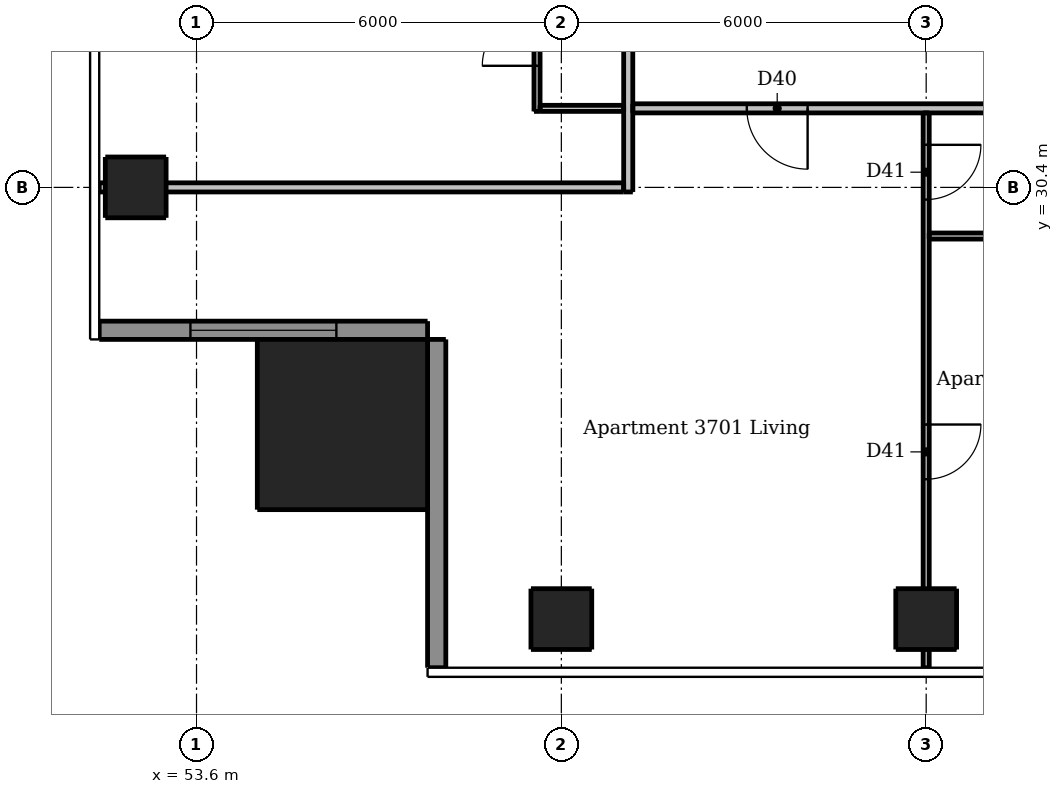
"""IFC4 building model, lengths in metres.
Left out: names, types, materials, properties, quantities, classifications, styles, units other than length and angle.
Written with IfcOpenShell. Run it as: python <this file> out.ifc"""

import sys

from ifc_helpers import new_model, si_unit, direction, frame, frame_2d, origin, origin_2d, place, context, subcontext, project, spatial, rectangle, extrude, element, fill, save


model = new_model("IFC4")
c1 = context("Model", 3, precision=1e-05, world=origin(), true_north=direction((0.0, 1.0)))
c2 = subcontext(c1, "Body", "Model", "MODEL_VIEW")
j1 = project(units=[si_unit("LENGTHUNIT", "METRE"), si_unit("PLANEANGLEUNIT", "RADIAN")], contexts=[c1])
p1 = place(None, origin())
s1 = spatial("IfcSite", under=j1, at=p1, CompositionType="ELEMENT")
p2 = place(p1, origin())
s2 = spatial("IfcBuilding", under=s1, at=p2, CompositionType="ELEMENT")
p3 = place(p2, frame((0.0, 0.0, 140.5)))
s3 = spatial("IfcBuildingStorey", under=s2, at=p3, CompositionType="ELEMENT", Elevation=140.5)
for number, where, z_axis, x_axis in (
    (1, (59.6, 23.3, 0.0), (0.0, 0.0, 1.0), (1.0, 0.0, 0.0)),
    (2, (65.6, 23.3, 0.0), (0.0, 0.0, 1.0), (1.0, 0.0, 0.0)),
    (3, (52.6, 30.4, 0.0), (0.0, 0.0, 1.0), (1.0, 0.0, 0.0)),
):
    element("IfcColumn", number, at=place(p3, frame(where, z_axis=z_axis, x_axis=x_axis)), inside=s3, PredefinedType="COLUMN", context=c2, shape_type="SweptSolid", body=[
        extrude(rectangle(XDim=1.0, YDim=1.0, at=origin_2d()), origin(), (0.0, 0.0, 1.0), 3.05),
    ])
p4 = place(p3, frame((56.0, 26.5, 0.0), z_axis=(0.0, 0.0, 1.0), x_axis=(1.0, 0.0, 0.0)))
e4 = element("IfcColumn", 4, at=p4, inside=s3, PredefinedType="COLUMN", context=c2, shape_type="SweptSolid", body=[
    extrude(rectangle(XDim=2.8, YDim=2.8, at=origin_2d()), origin(), (0.0, 0.0, 1.0), 3.3),
])
p5 = place(p3, frame((52.0, 28.05, 0.0), z_axis=(0.0, 0.0, 1.0), x_axis=(1.0, 0.0, 0.0)))
e5 = element("IfcWall", 5, at=p5, inside=s3, PredefinedType="SOLIDWALL", context=c2, shape_type="SweptSolid", body=[
    extrude(rectangle(XDim=5.4, YDim=0.3, at=frame_2d((2.7, 0.0))), origin(), (0.0, 0.0, 1.0), 3.05),
])
p6 = place(p5, frame((1.5, 0.0, 0.15)))
e6 = element("IfcOpeningElement", 6, at=p6, cuts=e5, PredefinedType="OPENING", context=c2, shape_type="SweptSolid", body=[
    extrude(rectangle(XDim=2.4, YDim=2.1, at=frame_2d((1.2, 1.05))), frame((0.0, 0.16, 0.0), z_axis=(0.0, -1.0, 0.0), x_axis=(1.0, 0.0, 0.0)), (0.0, 0.0, 1.0), 0.32),
])
p7 = place(p3, frame((57.55, 27.9, 0.0), z_axis=(0.0, 0.0, 1.0), x_axis=(0.0, -1.0, 0.0)))
e7 = element("IfcWall", 7, at=p7, inside=s3, PredefinedType="SOLIDWALL", context=c2, shape_type="SweptSolid", body=[
    extrude(rectangle(XDim=5.4, YDim=0.3, at=frame_2d((2.7, 0.0))), origin(), (0.0, 0.0, 1.0), 3.05),
])
p8 = place(p3, frame((59.2, 31.65, 0.0), z_axis=(0.0, 0.0, 1.0), x_axis=(0.0, 1.0, 0.0)))
e8 = element("IfcWall", 8, at=p8, inside=s3, PredefinedType="PARTITIONING", context=c2, shape_type="SweptSolid", body=[
    extrude(rectangle(XDim=16.675, YDim=0.1, at=frame_2d((8.337, 0.0))), origin(), (0.0, 0.0, 1.0), 3.05),
])
p9 = place(p8, frame((0.75, 0.0, 0.0)))
e9 = element("IfcOpeningElement", 9, at=p9, cuts=e8, PredefinedType="OPENING", context=c2, shape_type="SweptSolid", body=[
    extrude(rectangle(XDim=0.9, YDim=2.1, at=frame_2d((0.45, 1.05))), frame((0.0, 0.06, 0.0), z_axis=(0.0, -1.0, 0.0), x_axis=(1.0, 0.0, 0.0)), (0.0, 0.0, 1.0), 0.12),
])
p10 = place(p8, frame((3.1, 0.0, 0.0)))
e10 = element("IfcOpeningElement", 10, at=p10, cuts=e8, PredefinedType="OPENING", context=c2, shape_type="SweptSolid", body=[
    extrude(rectangle(XDim=0.9, YDim=2.1, at=frame_2d((0.45, 1.05))), frame((0.0, 0.06, 0.0), z_axis=(0.0, -1.0, 0.0), x_axis=(1.0, 0.0, 0.0)), (0.0, 0.0, 1.0), 0.12),
])
p11 = place(p8, frame((8.5, 0.0, 0.0)))
e11 = element("IfcOpeningElement", 11, at=p11, cuts=e8, PredefinedType="OPENING", context=c2, shape_type="SweptSolid", body=[
    extrude(rectangle(XDim=0.9, YDim=2.1, at=frame_2d((0.45, 1.05))), frame((0.0, 0.06, 0.0), z_axis=(0.0, -1.0, 0.0), x_axis=(1.0, 0.0, 0.0)), (0.0, 0.0, 1.0), 0.12),
])
p12 = place(p8, frame((14.5, 0.0, 0.0)))
e12 = element("IfcOpeningElement", 12, at=p12, cuts=e8, PredefinedType="OPENING", context=c2, shape_type="SweptSolid", body=[
    extrude(rectangle(XDim=0.9, YDim=2.1, at=frame_2d((0.45, 1.05))), frame((0.0, 0.06, 0.0), z_axis=(0.0, -1.0, 0.0), x_axis=(1.0, 0.0, 0.0)), (0.0, 0.0, 1.0), 0.12),
])
p13 = place(p8, frame((5.55, 0.0, 0.0)))
e13 = element("IfcOpeningElement", 13, at=p13, cuts=e8, PredefinedType="OPENING", context=c2, shape_type="SweptSolid", body=[
    extrude(rectangle(XDim=0.8, YDim=2.1, at=frame_2d((0.4, 1.05))), frame((0.0, 0.06, 0.0), z_axis=(0.0, -1.0, 0.0), x_axis=(1.0, 0.0, 0.0)), (0.0, 0.0, 1.0), 0.12),
])
p14 = place(p8, frame((11.55, 0.0, 0.0)))
e14 = element("IfcOpeningElement", 14, at=p14, cuts=e8, PredefinedType="OPENING", context=c2, shape_type="SweptSolid", body=[
    extrude(rectangle(XDim=0.8, YDim=2.1, at=frame_2d((0.4, 1.05))), frame((0.0, 0.06, 0.0), z_axis=(0.0, -1.0, 0.0), x_axis=(1.0, 0.0, 0.0)), (0.0, 0.0, 1.0), 0.12),
])
p15 = place(p3, frame((65.6, 31.625, 0.0), z_axis=(0.0, 0.0, 1.0), x_axis=(0.0, -1.0, 0.0)))
e15 = element("IfcWall", 15, at=p15, inside=s3, PredefinedType="PARTITIONING", context=c2, shape_type="SweptSolid", body=[
    extrude(rectangle(XDim=9.125, YDim=0.1, at=frame_2d((4.562, 0.0))), origin(), (0.0, 0.0, 1.0), 2.516),
])
p16 = place(p15, frame((0.525, 0.0, 0.0)))
e16 = element("IfcOpeningElement", 16, at=p16, cuts=e15, PredefinedType="OPENING", context=c2, shape_type="SweptSolid", body=[
    extrude(rectangle(XDim=0.9, YDim=2.1, at=frame_2d((0.45, 1.05))), frame((0.0, 0.06, 0.0), z_axis=(0.0, -1.0, 0.0), x_axis=(1.0, 0.0, 0.0)), (0.0, 0.0, 1.0), 0.12),
])
p17 = place(p15, frame((5.125, 0.0, 0.0)))
e17 = element("IfcOpeningElement", 17, at=p17, cuts=e15, PredefinedType="OPENING", context=c2, shape_type="SweptSolid", body=[
    extrude(rectangle(XDim=0.9, YDim=2.1, at=frame_2d((0.45, 1.05))), frame((0.0, 0.06, 0.0), z_axis=(0.0, -1.0, 0.0), x_axis=(1.0, 0.0, 0.0)), (0.0, 0.0, 1.0), 0.12),
])
p18 = place(p3, frame((59.25, 31.7, 0.0), z_axis=(0.0, 0.0, 1.0), x_axis=(1.0, 0.0, 0.0)))
e18 = element("IfcWall", 18, at=p18, inside=s3, PredefinedType="PARTITIONING", context=c2, shape_type="SweptSolid", body=[
    extrude(rectangle(XDim=1.375, YDim=0.1, at=frame_2d((0.688, 0.0))), origin(), (0.0, 0.0, 1.0), 3.05),
])
p19 = place(p3, frame((65.65, 29.6, 0.0), z_axis=(0.0, 0.0, 1.0), x_axis=(1.0, 0.0, 0.0)))
e19 = element("IfcWall", 19, at=p19, inside=s3, PredefinedType="PARTITIONING", context=c2, shape_type="SweptSolid", body=[
    extrude(rectangle(XDim=5.875, YDim=0.1, at=frame_2d((2.938, 0.0))), origin(), (0.0, 0.0, 1.0), 3.05),
])
p20 = place(p19, frame((3.75, 0.0, 0.0)))
e20 = element("IfcOpeningElement", 20, at=p20, cuts=e19, PredefinedType="OPENING", context=c2, shape_type="SweptSolid", body=[
    extrude(rectangle(XDim=0.8, YDim=2.1, at=frame_2d((0.4, 1.05))), frame((0.0, 0.06, 0.0), z_axis=(0.0, -1.0, 0.0), x_axis=(1.0, 0.0, 0.0)), (0.0, 0.0, 1.0), 0.12),
])
p21 = place(p3, frame((60.7, 30.325, 0.0), z_axis=(0.0, 0.0, 1.0), x_axis=(0.0, 1.0, 0.0)))
e21 = element("IfcWall", 21, at=p21, inside=s3, PredefinedType="PARTITIONING", context=c2, shape_type="SweptSolid", body=[
    extrude(rectangle(XDim=28.9, YDim=0.15, at=frame_2d((14.45, 0.0))), origin(), (0.0, 0.0, 1.0), 3.05),
])
p22 = place(p21, frame((9.225, 0.0, 0.0)))
e22 = element("IfcOpeningElement", 22, at=p22, cuts=e21, PredefinedType="OPENING", context=c2, shape_type="SweptSolid", body=[
    extrude(rectangle(XDim=1.0, YDim=2.1, at=frame_2d((0.5, 1.05))), frame((0.0, 0.085, 0.0), z_axis=(0.0, -1.0, 0.0), x_axis=(1.0, 0.0, 0.0)), (0.0, 0.0, 1.0), 0.17),
])
p23 = place(p21, frame((26.025, 0.0, 0.0)))
e23 = element("IfcOpeningElement", 23, at=p23, cuts=e21, PredefinedType="OPENING", context=c2, shape_type="SweptSolid", body=[
    extrude(rectangle(XDim=1.0, YDim=2.1, at=frame_2d((0.5, 1.05))), frame((0.0, 0.085, 0.0), z_axis=(0.0, -1.0, 0.0), x_axis=(1.0, 0.0, 0.0)), (0.0, 0.0, 1.0), 0.17),
])
p24 = place(p3, frame((89.525, 31.7, 0.0), z_axis=(0.0, 0.0, 1.0), x_axis=(-1.0, 0.0, 0.0)))
e24 = element("IfcWall", 24, at=p24, inside=s3, PredefinedType="PARTITIONING", context=c2, shape_type="SweptSolid", body=[
    extrude(rectangle(XDim=28.75, YDim=0.15, at=frame_2d((14.375, 0.0))), origin(), (0.0, 0.0, 1.0), 3.05),
])
p25 = place(p24, frame((25.875, 0.0, 0.0)))
e25 = element("IfcOpeningElement", 25, at=p25, cuts=e24, PredefinedType="OPENING", context=c2, shape_type="SweptSolid", body=[
    extrude(rectangle(XDim=1.0, YDim=2.1, at=frame_2d((0.5, 1.05))), frame((0.0, 0.085, 0.0), z_axis=(0.0, -1.0, 0.0), x_axis=(1.0, 0.0, 0.0)), (0.0, 0.0, 1.0), 0.17),
])
p26 = place(p24, frame((9.075, 0.0, 0.0)))
e26 = element("IfcOpeningElement", 26, at=p26, cuts=e24, PredefinedType="OPENING", context=c2, shape_type="SweptSolid", body=[
    extrude(rectangle(XDim=1.0, YDim=2.1, at=frame_2d((0.5, 1.05))), frame((0.0, 0.085, 0.0), z_axis=(0.0, -1.0, 0.0), x_axis=(1.0, 0.0, 0.0)), (0.0, 0.0, 1.0), 0.17),
])
p27 = place(p3, frame((52.0, 30.4, 0.0), z_axis=(0.0, 0.0, 1.0), x_axis=(1.0, 0.0, 0.0)))
e27 = element("IfcWall", 27, at=p27, inside=s3, PredefinedType="PARTITIONING", context=c2, shape_type="SweptSolid", body=[
    extrude(rectangle(XDim=8.625, YDim=0.15, at=frame_2d((4.312, 0.0))), origin(), (0.0, 0.0, 1.0), 2.647),
])
p28 = place(p6, origin())
e28 = element("IfcWindow", 28, at=p28, inside=s3, PartitioningType="DOUBLE_PANEL_VERTICAL", PredefinedType="WINDOW", context=c2, shape_type="SweptSolid", body=[
    extrude(rectangle(XDim=2.4, YDim=2.1, at=frame_2d((1.2, 1.05))), frame((0.0, 0.03, 0.0), z_axis=(0.0, -1.0, 0.0), x_axis=(1.0, 0.0, 0.0)), (0.0, 0.0, 1.0), 0.06),
])
fill(e6, e28)
p29 = place(p25, origin())
e29 = element("IfcDoor", 29, at=p29, inside=s3, OperationType="SINGLE_SWING_LEFT", PredefinedType="DOOR", context=c2, shape_type="SweptSolid", body=[
    extrude(rectangle(XDim=1.0, YDim=2.1, at=frame_2d((0.5, 1.05))), frame((0.0, 0.025, 0.0), z_axis=(0.0, -1.0, 0.0), x_axis=(1.0, 0.0, 0.0)), (0.0, 0.0, 1.0), 0.05),
])
fill(e25, e29)
p30 = place(p16, origin())
e30 = element("IfcDoor", 30, at=p30, inside=s3, OperationType="SINGLE_SWING_LEFT", PredefinedType="DOOR", context=c2, shape_type="SweptSolid", body=[
    extrude(rectangle(XDim=0.9, YDim=2.1, at=frame_2d((0.45, 1.05))), frame((0.0, 0.025, 0.0), z_axis=(0.0, -1.0, 0.0), x_axis=(1.0, 0.0, 0.0)), (0.0, 0.0, 1.0), 0.05),
])
fill(e16, e30)
p31 = place(p17, origin())
e31 = element("IfcDoor", 31, at=p31, inside=s3, OperationType="SINGLE_SWING_LEFT", PredefinedType="DOOR", context=c2, shape_type="SweptSolid", body=[
    extrude(rectangle(XDim=0.9, YDim=2.1, at=frame_2d((0.45, 1.05))), frame((0.0, 0.025, 0.0), z_axis=(0.0, -1.0, 0.0), x_axis=(1.0, 0.0, 0.0)), (0.0, 0.0, 1.0), 0.05),
])
fill(e17, e31)
p32 = place(p9, origin())
e32 = element("IfcDoor", 32, at=p32, inside=s3, OperationType="SINGLE_SWING_LEFT", PredefinedType="DOOR", context=c2, shape_type="SweptSolid", body=[
    extrude(rectangle(XDim=0.9, YDim=2.1, at=frame_2d((0.45, 1.05))), frame((0.0, 0.025, 0.0), z_axis=(0.0, -1.0, 0.0), x_axis=(1.0, 0.0, 0.0)), (0.0, 0.0, 1.0), 0.05),
])
fill(e9, e32)
save(model, sys.argv[1])
